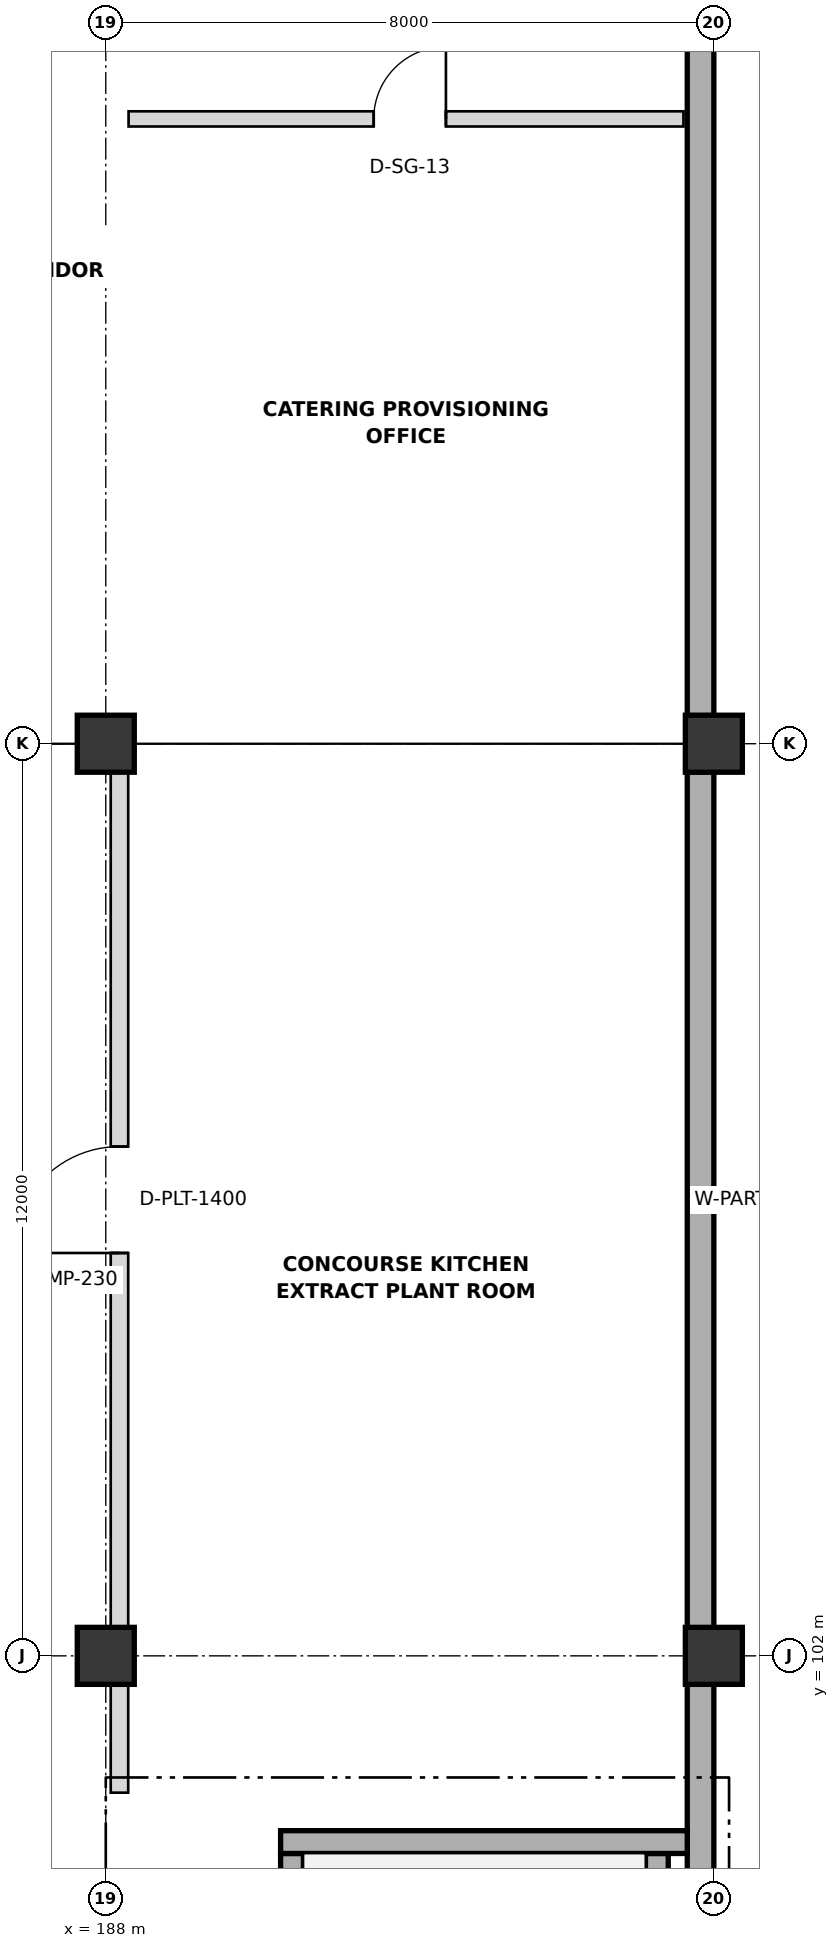
"""IFC4 building model, lengths in metres.
Left out: names, types, materials, properties, quantities, classifications, styles, units other than length and angle.
Written with IfcOpenShell. Run it as: python <this file> out.ifc"""

import sys

from ifc_helpers import new_model, si_unit, direction, frame, frame_2d, origin, origin_2d, place, context, subcontext, project, spatial, rectangle, extrude, element, fill, save


model = new_model("IFC4")
c1 = context("Model", 3, precision=1e-05, world=origin(), true_north=direction((0.0, 1.0)))
c2 = subcontext(c1, "Body", "Model", "MODEL_VIEW")
j1 = project(units=[si_unit("LENGTHUNIT", "METRE"), si_unit("PLANEANGLEUNIT", "RADIAN")], contexts=[c1])
p1 = place(None, origin())
s1 = spatial("IfcSite", under=j1, at=p1, CompositionType="ELEMENT")
p2 = place(p1, origin())
s2 = spatial("IfcBuilding", under=s1, at=p2, CompositionType="ELEMENT")
p3 = place(p2, frame((0.0, 0.0, 9.6)))
s3 = spatial("IfcBuildingStorey", under=s2, at=p3, CompositionType="ELEMENT", Elevation=9.6)
for number, where, z_axis, x_axis in (
    (1, (188.0, 102.0, 0.0), (0.0, 0.0, 1.0), (1.0, 0.0, 0.0)),
    (2, (188.0, 114.0, 0.0), (0.0, 0.0, 1.0), (1.0, 0.0, 0.0)),
    (3, (196.0, 102.0, 0.0), (0.0, 0.0, 1.0), (1.0, 0.0, 0.0)),
    (4, (196.0, 114.0, 0.0), (0.0, 0.0, 1.0), (1.0, 0.0, 0.0)),
):
    element("IfcColumn", number, at=place(p3, frame(where, z_axis=z_axis, x_axis=x_axis)), inside=s3, PredefinedType="COLUMN", context=c2, shape_type="SweptSolid", body=[
        extrude(rectangle(XDim=0.75, YDim=0.75, at=origin_2d()), origin(), (0.0, 0.0, 1.0), 4.8),
    ])
for number, where, z_axis, x_axis in (
    (5, (195.825, 101.63, 0.0), (0.0, 0.0, 1.0), (0.0, -1.0, 0.0)),
    (6, (195.825, 113.63, 0.0), (0.0, 0.0, 1.0), (0.0, -1.0, 0.0)),
    (7, (195.825, 125.63, 0.0), (0.0, 0.0, 1.0), (0.0, -1.0, 0.0)),
):
    element("IfcWall", number, at=place(p3, frame(where, z_axis=z_axis, x_axis=x_axis)), inside=s3, PredefinedType="SOLIDWALL", context=c2, shape_type="SweptSolid", body=[
        extrude(rectangle(XDim=11.26, YDim=0.35, at=frame_2d((5.63, 0.0))), origin(), (0.0, 0.0, 1.0), 4.8),
    ])
for number, where, z_axis, x_axis in (
    (8, (190.45, 90.8, 0.0), (0.0, 0.0, 1.0), (0.0, 1.0, 0.0)),
    (9, (195.25, 99.4, 0.0), (0.0, 0.0, 1.0), (0.0, -1.0, 0.0)),
):
    element("IfcWall", number, at=place(p3, frame(where, z_axis=z_axis, x_axis=x_axis)), inside=s3, PredefinedType="SHEAR", context=c2, shape_type="SweptSolid", body=[
        extrude(rectangle(XDim=8.6, YDim=0.3, at=frame_2d((4.3, 0.0))), origin(), (0.0, 0.0, 1.0), 4.8),
    ])
p4 = place(p3, frame((190.3, 99.55, 0.0), z_axis=(0.0, 0.0, 1.0), x_axis=(1.0, 0.0, 0.0)))
e10 = element("IfcWall", 10, at=p4, inside=s3, PredefinedType="SHEAR", context=c2, shape_type="SweptSolid", body=[
    extrude(rectangle(XDim=5.35, YDim=0.3, at=frame_2d((2.675, 0.0))), origin(), (0.0, 0.0, 1.0), 4.8),
])
p5 = place(p3, frame((188.3, 122.22, 0.0), z_axis=(0.0, 0.0, 1.0), x_axis=(1.0, 0.0, 0.0)))
e11 = element("IfcWall", 11, at=p5, inside=s3, PredefinedType="PARTITIONING", context=c2, shape_type="SweptSolid", body=[
    extrude(rectangle(XDim=7.3, YDim=0.2, at=frame_2d((3.65, 0.0))), origin(), (0.0, 0.0, 1.0), 3.758),
])
p6 = place(p5, frame((3.225, 0.0, 0.0)))
e12 = element("IfcOpeningElement", 12, at=p6, cuts=e11, PredefinedType="OPENING", context=c2, shape_type="SweptSolid", body=[
    extrude(rectangle(XDim=0.95, YDim=2.3, at=frame_2d((0.475, 1.15))), frame((0.0, 0.11, 0.0), z_axis=(0.0, -1.0, 0.0), x_axis=(1.0, 0.0, 0.0)), (0.0, 0.0, 1.0), 0.22),
])
p7 = place(p3, frame((188.18, 100.2, 0.0), z_axis=(0.0, 0.0, 1.0), x_axis=(0.0, 1.0, 0.0)))
e13 = element("IfcWall", 13, at=p7, inside=s3, PredefinedType="PARTITIONING", context=c2, shape_type="SweptSolid", body=[
    extrude(rectangle(XDim=13.5, YDim=0.23, at=frame_2d((6.75, 0.0))), origin(), (0.0, 0.0, 1.0), 3.658),
])
p8 = place(p7, frame((7.1, 0.0, 0.0)))
e14 = element("IfcOpeningElement", 14, at=p8, cuts=e13, PredefinedType="OPENING", context=c2, shape_type="SweptSolid", body=[
    extrude(rectangle(XDim=1.4, YDim=2.2, at=frame_2d((0.7, 1.1))), frame((0.0, 0.125, 0.0), z_axis=(0.0, -1.0, 0.0), x_axis=(1.0, 0.0, 0.0)), (0.0, 0.0, 1.0), 0.25),
])
p9 = place(p6, origin())
e15 = element("IfcDoor", 15, at=p9, inside=s3, OperationType="SINGLE_SWING_RIGHT", PredefinedType="DOOR", context=c2, shape_type="SweptSolid", body=[
    extrude(rectangle(XDim=0.95, YDim=2.3, at=frame_2d((0.475, 1.15))), frame((0.0, 0.025, 0.0), z_axis=(0.0, -1.0, 0.0), x_axis=(1.0, 0.0, 0.0)), (0.0, 0.0, 1.0), 0.05),
])
fill(e12, e15)
p10 = place(p8, origin())
e16 = element("IfcDoor", 16, at=p10, inside=s3, OperationType="SINGLE_SWING_LEFT", PredefinedType="DOOR", context=c2, shape_type="SweptSolid", body=[
    extrude(rectangle(XDim=1.4, YDim=2.2, at=frame_2d((0.7, 1.1))), frame((0.0, 0.025, 0.0), z_axis=(0.0, -1.0, 0.0), x_axis=(1.0, 0.0, 0.0)), (0.0, 0.0, 1.0), 0.05),
])
fill(e14, e16)
save(model, sys.argv[1])
